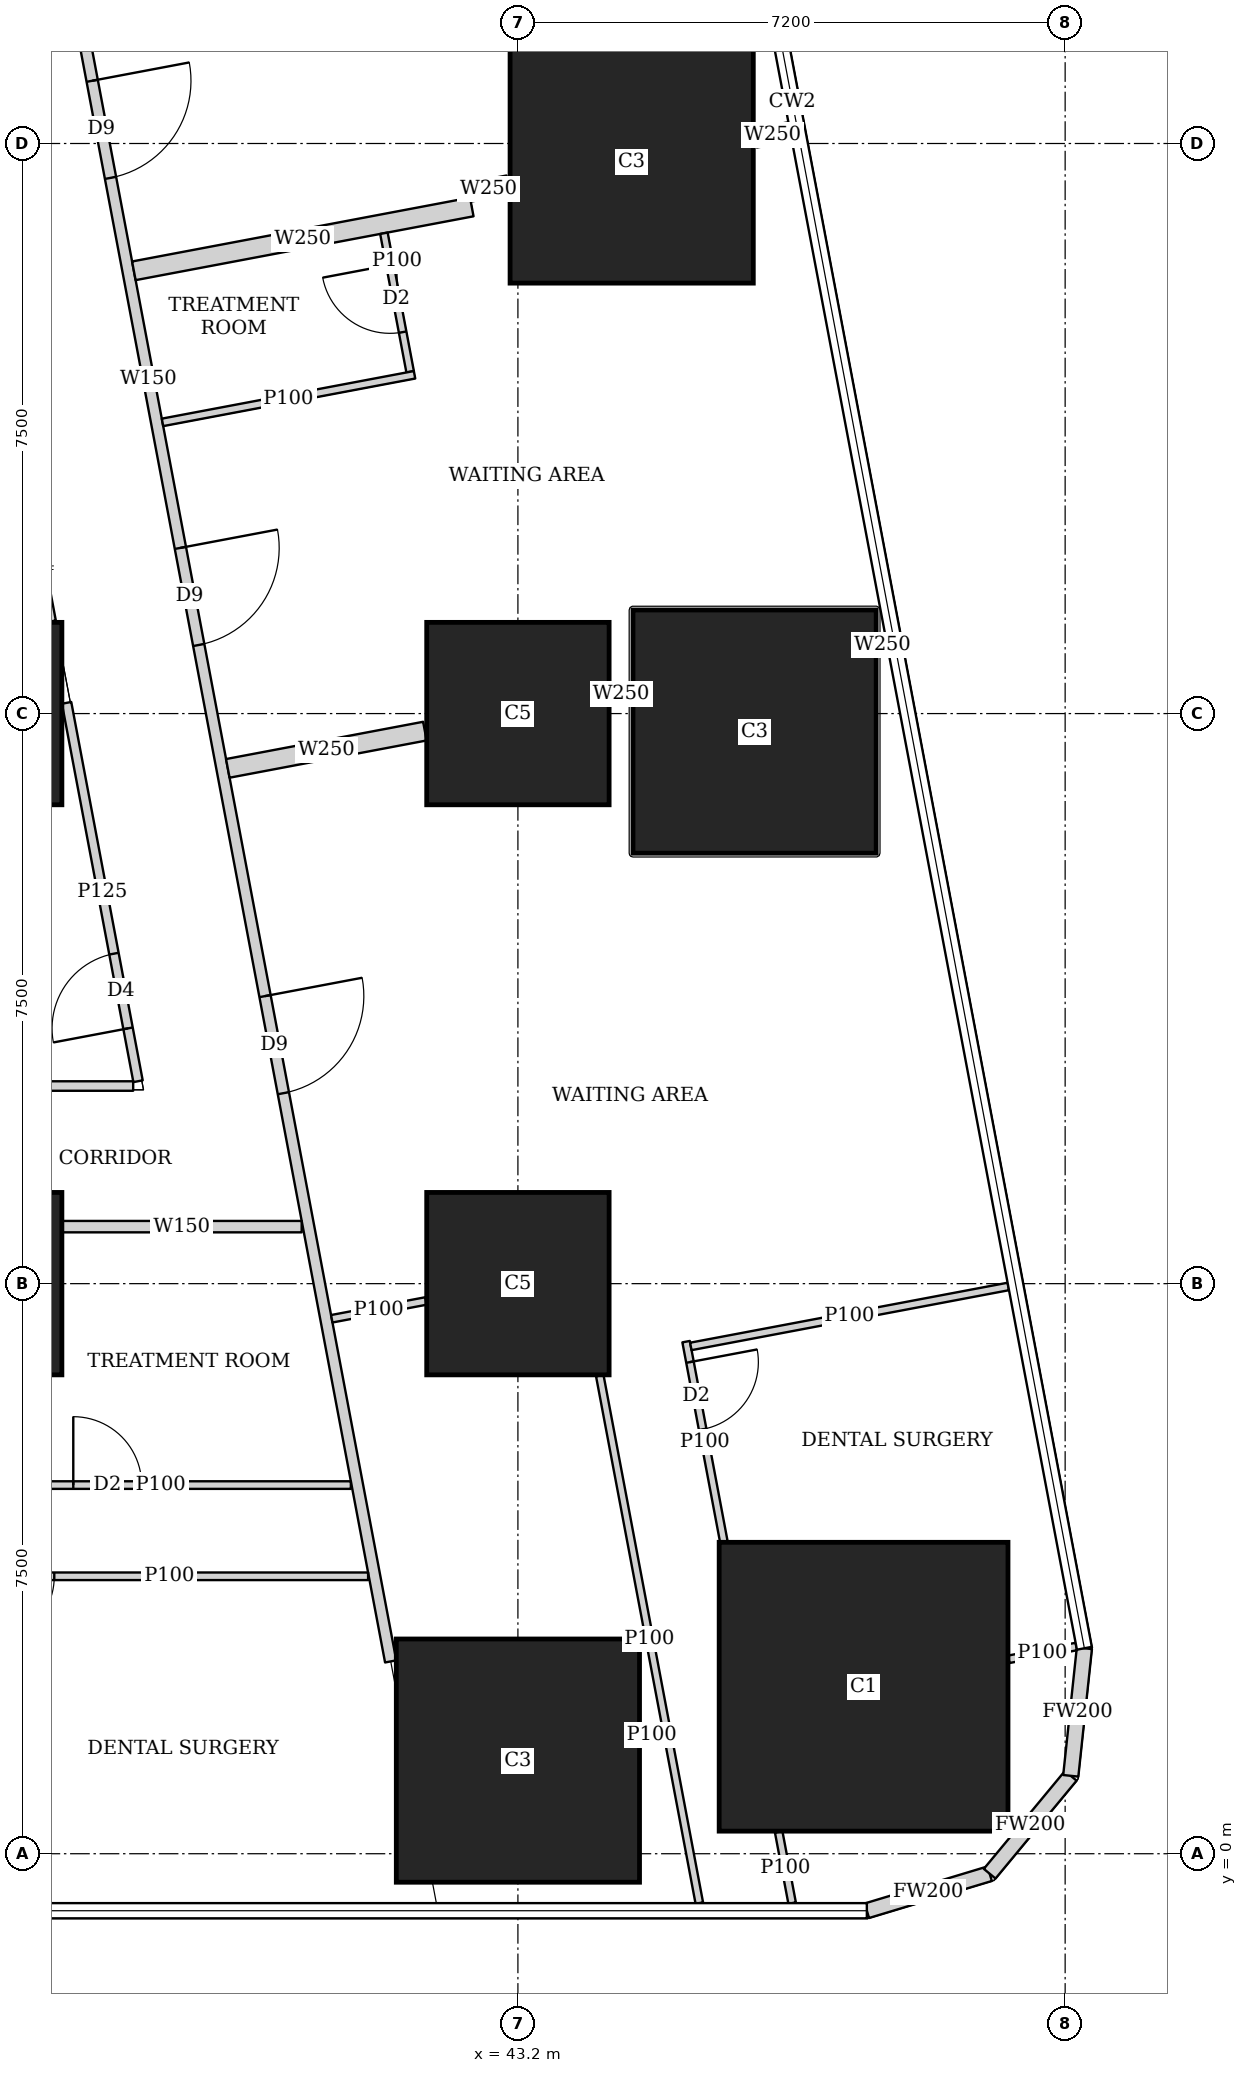
"""IFC4 building model, lengths in metres.
Left out: names, types, materials, properties, quantities, classifications, styles, units other than length and angle.
Written with IfcOpenShell. Run it as: python <this file> out.ifc"""

import sys

from ifc_helpers import new_model, si_unit, direction, frame, frame_2d, origin, origin_2d, place, context, subcontext, project, spatial, rectangle, extrude, element, fill, save


model = new_model("IFC4")
c1 = context("Model", 3, precision=1e-05, world=origin(), true_north=direction((0.0, 1.0)))
c2 = subcontext(c1, "Body", "Model", "MODEL_VIEW")
j1 = project(units=[si_unit("LENGTHUNIT", "METRE"), si_unit("PLANEANGLEUNIT", "RADIAN")], contexts=[c1])
p1 = place(None, origin())
s1 = spatial("IfcSite", under=j1, at=p1, CompositionType="ELEMENT")
p2 = place(p1, origin())
s2 = spatial("IfcBuilding", under=s1, at=p2, CompositionType="ELEMENT")
p3 = place(p2, frame((0.0, 0.0, 10.1)))
s3 = spatial("IfcBuildingStorey", under=s2, at=p3, CompositionType="ELEMENT", Elevation=10.1)
p4 = place(p3, frame((43.2, 1.225, 0.0), z_axis=(0.0, 0.0, 1.0), x_axis=(1.0, 0.0, 0.0)))
e1 = element("IfcColumn", 1, at=p4, inside=s3, PredefinedType="COLUMN", context=c2, shape_type="SweptSolid", body=[
    extrude(rectangle(XDim=3.2, YDim=3.2, at=origin_2d()), origin(), (0.0, 0.0, 1.0), 4.5),
])
p5 = place(p3, frame((47.748, 2.197, 0.0), z_axis=(0.0, 0.0, 1.0), x_axis=(1.0, 0.0, 0.0)))
e2 = element("IfcColumn", 2, at=p5, inside=s3, PredefinedType="COLUMN", context=c2, shape_type="SweptSolid", body=[
    extrude(rectangle(XDim=3.8, YDim=3.8, at=origin_2d()), origin(), (0.0, 0.0, 1.0), 4.5),
])
for number, where, z_axis, x_axis in (
    (3, (36.0, 7.5, 0.0), (0.0, 0.0, 1.0), (1.0, 0.0, 0.0)),
    (4, (43.2, 7.5, 0.0), (0.0, 0.0, 1.0), (1.0, 0.0, 0.0)),
    (5, (36.0, 15.0, 0.0), (0.0, 0.0, 1.0), (1.0, 0.0, 0.0)),
    (6, (43.2, 15.0, 0.0), (0.0, 0.0, 1.0), (1.0, 0.0, 0.0)),
):
    element("IfcColumn", number, at=place(p3, frame(where, z_axis=z_axis, x_axis=x_axis)), inside=s3, PredefinedType="COLUMN", context=c2, shape_type="SweptSolid", body=[
        extrude(rectangle(XDim=2.4, YDim=2.4, at=origin_2d()), origin(), (0.0, 0.0, 1.0), 4.5),
    ])
for number, where, z_axis, x_axis in (
    (7, (46.314, 14.763, 0.0), (0.0, 0.0, 1.0), (1.0, 0.0, 0.0)),
    (8, (44.697, 22.263, 0.0), (0.0, 0.0, 1.0), (1.0, 0.0, 0.0)),
):
    element("IfcColumn", number, at=place(p3, frame(where, z_axis=z_axis, x_axis=x_axis)), inside=s3, PredefinedType="COLUMN", context=c2, shape_type="SweptSolid", body=[
        extrude(rectangle(XDim=3.2, YDim=3.2, at=origin_2d()), origin(), (0.0, 0.0, 1.0), 4.5),
    ])
p6 = place(p3, frame((47.791, -0.75, 0.0), z_axis=(0.0, 0.0, 1.0), x_axis=(0.957455232626, 0.288581838509, 0.0)))
e9 = element("IfcWall", 9, at=p6, inside=s3, PredefinedType="SOLIDWALL", context=c2, shape_type="SweptSolid", body=[
    extrude(rectangle(XDim=1.688, YDim=0.2, at=frame_2d((0.844, 0.0))), origin(), (0.0, 0.0, 1.0), 4.2),
])
p7 = place(p3, frame((49.407, -0.263, 0.0), z_axis=(0.0, 0.0, 1.0), x_axis=(0.638042593423, 0.770001070764, 0.0)))
e10 = element("IfcWall", 10, at=p7, inside=s3, PredefinedType="SOLIDWALL", context=c2, shape_type="SweptSolid", body=[
    extrude(rectangle(XDim=1.673, YDim=0.2, at=frame_2d((0.836, 0.0))), origin(), (0.0, 0.0, 1.0), 4.2),
])
p8 = place(p3, frame((50.474, 1.025, 0.0), z_axis=(0.0, 0.0, 1.0), x_axis=(0.106047815515, 0.994361031429, 0.0)))
e11 = element("IfcWall", 11, at=p8, inside=s3, PredefinedType="SOLIDWALL", context=c2, shape_type="SweptSolid", body=[
    extrude(rectangle(XDim=1.688, YDim=0.2, at=frame_2d((0.844, 0.0))), origin(), (0.0, 0.0, 1.0), 4.2),
])
p9 = place(p3, frame((40.355, 8.25, 0.0), z_axis=(0.0, 0.0, 1.0), x_axis=(-1.0, 0.0, 0.0)))
e12 = element("IfcWall", 12, at=p9, inside=s3, PredefinedType="SOLIDWALL", context=c2, shape_type="SweptSolid", body=[
    extrude(rectangle(XDim=3.154, YDim=0.15, at=frame_2d((1.577, 0.0))), origin(), (0.0, 0.0, 1.0), 2.6),
])
p10 = place(p3, frame((35.151, 36.285, 0.0), z_axis=(0.0, 0.0, 1.0), x_axis=(0.18558085056, -0.982628998099, 0.0)))
e13 = element("IfcWall", 13, at=p10, inside=s3, PredefinedType="SOLIDWALL", context=c2, shape_type="SweptSolid", body=[
    extrude(rectangle(XDim=34.352, YDim=0.15, at=frame_2d((17.176, 0.0))), origin(), (0.0, 0.0, 1.0), 2.4),
])
p11 = place(p10, frame((13.189, 0.0, 0.0)))
e14 = element("IfcOpeningElement", 14, at=p11, cuts=e13, PredefinedType="OPENING", context=c2, shape_type="SweptSolid", body=[
    extrude(rectangle(XDim=1.3, YDim=2.1, at=frame_2d((0.65, 1.05))), frame((0.0, 0.085, 0.0), z_axis=(0.0, -1.0, 0.0), x_axis=(1.0, 0.0, 0.0)), (0.0, 0.0, 1.0), 0.17),
])
p12 = place(p10, frame((19.443, 0.0, 0.0)))
e15 = element("IfcOpeningElement", 15, at=p12, cuts=e13, PredefinedType="OPENING", context=c2, shape_type="SweptSolid", body=[
    extrude(rectangle(XDim=1.3, YDim=2.1, at=frame_2d((0.65, 1.05))), frame((0.0, 0.085, 0.0), z_axis=(0.0, -1.0, 0.0), x_axis=(1.0, 0.0, 0.0)), (0.0, 0.0, 1.0), 0.17),
])
p13 = place(p10, frame((25.444, 0.0, 0.0)))
e16 = element("IfcOpeningElement", 16, at=p13, cuts=e13, PredefinedType="OPENING", context=c2, shape_type="SweptSolid", body=[
    extrude(rectangle(XDim=1.3, YDim=2.1, at=frame_2d((0.65, 1.05))), frame((0.0, 0.085, 0.0), z_axis=(0.0, -1.0, 0.0), x_axis=(1.0, 0.0, 0.0)), (0.0, 0.0, 1.0), 0.17),
])
p14 = place(p3, frame((41.229, 3.65, 0.0), z_axis=(0.0, 0.0, 1.0), x_axis=(-1.0, 0.0, 0.0)))
e17 = element("IfcWall", 17, at=p14, inside=s3, PredefinedType="PARTITIONING", context=c2, shape_type="SweptSolid", body=[
    extrude(rectangle(XDim=5.229, YDim=0.1, at=frame_2d((2.615, 0.0))), origin(), (0.0, 0.0, 1.0), 4.2),
])
p15 = place(p14, frame((4.129, 0.0, 0.0)))
e18 = element("IfcOpeningElement", 18, at=p15, cuts=e17, PredefinedType="OPENING", context=c2, shape_type="SweptSolid", body=[
    extrude(rectangle(XDim=0.9, YDim=2.1, at=frame_2d((0.45, 1.05))), frame((0.0, 0.06, 0.0), z_axis=(0.0, -1.0, 0.0), x_axis=(1.0, 0.0, 0.0)), (0.0, 0.0, 1.0), 0.12),
])
p16 = place(p3, frame((41.002, 4.85, 0.0), z_axis=(0.0, 0.0, 1.0), x_axis=(-1.0, 0.0, 0.0)))
e19 = element("IfcWall", 19, at=p16, inside=s3, PredefinedType="PARTITIONING", context=c2, shape_type="SweptSolid", body=[
    extrude(rectangle(XDim=5.002, YDim=0.1, at=frame_2d((2.501, 0.0))), origin(), (0.0, 0.0, 1.0), 4.2),
])
p17 = place(p16, frame((2.752, 0.0, 0.0)))
e20 = element("IfcOpeningElement", 20, at=p17, cuts=e19, PredefinedType="OPENING", context=c2, shape_type="SweptSolid", body=[
    extrude(rectangle(XDim=0.9, YDim=2.1, at=frame_2d((0.45, 1.05))), frame((0.0, 0.06, 0.0), z_axis=(0.0, -1.0, 0.0), x_axis=(1.0, 0.0, 0.0)), (0.0, 0.0, 1.0), 0.12),
])
p18 = place(p3, frame((41.437, 21.319, 0.0), z_axis=(0.0, 0.0, 1.0), x_axis=(0.186029078128, -0.982544239254, 0.0)))
e21 = element("IfcWall", 21, at=p18, inside=s3, PredefinedType="PARTITIONING", context=c2, shape_type="SweptSolid", body=[
    extrude(rectangle(XDim=1.854, YDim=0.1, at=frame_2d((0.927, 0.0))), origin(), (0.0, 0.0, 1.0), 4.2),
])
p19 = place(p18, frame((0.424, 0.0, 0.0)))
e22 = element("IfcOpeningElement", 22, at=p19, cuts=e21, PredefinedType="OPENING", context=c2, shape_type="SweptSolid", body=[
    extrude(rectangle(XDim=0.9, YDim=2.1, at=frame_2d((0.45, 1.05))), frame((0.0, 0.06, 0.0), z_axis=(0.0, -1.0, 0.0), x_axis=(1.0, 0.0, 0.0)), (0.0, 0.0, 1.0), 0.12),
])
p20 = place(p3, frame((41.84, 19.457, 0.0), z_axis=(0.0, 0.0, 1.0), x_axis=(-0.98264623159, -0.185489577987, 0.0)))
e23 = element("IfcWall", 23, at=p20, inside=s3, PredefinedType="PARTITIONING", context=c2, shape_type="SweptSolid", body=[
    extrude(rectangle(XDim=3.375, YDim=0.1, at=frame_2d((1.688, 0.0))), origin(), (0.0, 0.0, 1.0), 4.2),
])
p21 = place(p3, frame((46.782, 22.657, 0.0), z_axis=(0.0, 0.0, 1.0), x_axis=(-0.982683117999, -0.185294062504, 0.0)))
e24 = element("IfcWall", 24, at=p21, inside=s3, PredefinedType="SOLIDWALL", context=c2, shape_type="SweptSolid", body=[
    extrude(rectangle(XDim=0.469, YDim=0.25, at=frame_2d((0.234, 0.0))), origin(), (0.0, 0.0, 1.0), 2.4),
])
p22 = place(p3, frame((43.073, 21.956, 0.0), z_axis=(0.0, 0.0, 1.0), x_axis=(-0.982395465615, -0.18681313963, 0.0)))
e25 = element("IfcWall", 25, at=p22, inside=s3, PredefinedType="SOLIDWALL", context=c2, shape_type="SweptSolid", body=[
    extrude(rectangle(XDim=0.525, YDim=0.25, at=frame_2d((0.263, 0.0))), origin(), (0.0, 0.0, 1.0), 2.6),
])
p23 = place(p3, frame((42.593, 21.665, 0.0), z_axis=(0.0, 0.0, 1.0), x_axis=(-0.982612837616, -0.185666398014, 0.0)))
e26 = element("IfcWall", 26, at=p23, inside=s3, PredefinedType="SOLIDWALL", context=c2, shape_type="SweptSolid", body=[
    extrude(rectangle(XDim=4.525, YDim=0.25, at=frame_2d((2.262, 0.0))), origin(), (0.0, 0.0, 1.0), 2.6),
])
p24 = place(p3, frame((45.413, 6.737, 0.0), z_axis=(0.0, 0.0, 1.0), x_axis=(0.185263269673, -0.982688923775, 0.0)))
e27 = element("IfcWall", 27, at=p24, inside=s3, PredefinedType="PARTITIONING", context=c2, shape_type="SweptSolid", body=[
    extrude(rectangle(XDim=2.677, YDim=0.1, at=frame_2d((1.338, 0.0))), origin(), (0.0, 0.0, 1.0), 4.2),
])
p25 = place(p24, frame((0.274, 0.0, 0.0)))
e28 = element("IfcOpeningElement", 28, at=p25, cuts=e27, PredefinedType="OPENING", context=c2, shape_type="SweptSolid", body=[
    extrude(rectangle(XDim=0.9, YDim=2.1, at=frame_2d((0.45, 1.05))), frame((0.0, 0.06, 0.0), z_axis=(0.0, -1.0, 0.0), x_axis=(1.0, 0.0, 0.0)), (0.0, 0.0, 1.0), 0.12),
])
p26 = place(p3, frame((46.631, 0.287, 0.0), z_axis=(0.0, 0.0, 1.0), x_axis=(0.185617761613, -0.982622026302, 0.0)))
e29 = element("IfcWall", 29, at=p26, inside=s3, PredefinedType="PARTITIONING", context=c2, shape_type="SweptSolid", body=[
    extrude(rectangle(XDim=0.954, YDim=0.1, at=frame_2d((0.477, 0.0))), origin(), (0.0, 0.0, 1.0), 4.2),
])
p27 = place(p3, frame((44.277, 6.29, 0.0), z_axis=(0.0, 0.0, 1.0), x_axis=(0.18546139356, -0.982651551415, 0.0)))
e30 = element("IfcWall", 30, at=p27, inside=s3, PredefinedType="PARTITIONING", context=c2, shape_type="SweptSolid", body=[
    extrude(rectangle(XDim=7.062, YDim=0.1, at=frame_2d((3.531, 0.0))), origin(), (0.0, 0.0, 1.0), 4.2),
])
p28 = place(p3, frame((49.652, 7.463, 0.0), z_axis=(0.0, 0.0, 1.0), x_axis=(-0.982631433279, -0.185567956101, 0.0)))
e31 = element("IfcWall", 31, at=p28, inside=s3, PredefinedType="PARTITIONING", context=c2, shape_type="SweptSolid", body=[
    extrude(rectangle(XDim=4.251, YDim=0.1, at=frame_2d((2.125, 0.0))), origin(), (0.0, 0.0, 1.0), 2.4),
])
p29 = place(p3, frame((50.547, 2.726, 0.0), z_axis=(0.0, 0.0, 1.0), x_axis=(-0.982620821037, -0.18562414192, 0.0)))
e32 = element("IfcWall", 32, at=p29, inside=s3, PredefinedType="PARTITIONING", context=c2, shape_type="SweptSolid", body=[
    extrude(rectangle(XDim=0.905, YDim=0.1, at=frame_2d((0.452, 0.0))), origin(), (0.0, 0.0, 1.0), 4.2),
])
p30 = place(p3, frame((41.99, 7.272, 0.0), z_axis=(0.0, 0.0, 1.0), x_axis=(-0.982645675559, -0.185492523583, 0.0)))
e33 = element("IfcWall", 33, at=p30, inside=s3, PredefinedType="PARTITIONING", context=c2, shape_type="SweptSolid", body=[
    extrude(rectangle(XDim=1.261, YDim=0.1, at=frame_2d((0.63, 0.0))), origin(), (0.0, 0.0, 1.0), 2.6),
])
p31 = place(p3, frame((45.114, 1.587, 0.0), z_axis=(0.0, 0.0, 1.0), x_axis=(-0.982934694903, -0.183954846516, 0.0)))
e34 = element("IfcWall", 34, at=p31, inside=s3, PredefinedType="PARTITIONING", context=c2, shape_type="SweptSolid", body=[
    extrude(rectangle(XDim=0.309, YDim=0.1, at=frame_2d((0.155, 0.0))), origin(), (0.0, 0.0, 1.0), 4.2),
])
p32 = place(p3, frame((48.055, 15.917, 0.0), z_axis=(0.0, 0.0, 1.0), x_axis=(-0.98280243359, -0.184660164975, 0.0)))
e35 = element("IfcWall", 35, at=p32, inside=s3, PredefinedType="SOLIDWALL", context=c2, shape_type="SweptSolid", body=[
    extrude(rectangle(XDim=0.119, YDim=0.25, at=frame_2d((0.06, 0.0))), origin(), (0.0, 0.0, 1.0), 4.2),
])
p33 = place(p3, frame((44.69, 15.281, 0.0), z_axis=(0.0, 0.0, 1.0), x_axis=(-0.982739122219, -0.184996804458, 0.0)))
e36 = element("IfcWall", 36, at=p33, inside=s3, PredefinedType="SOLIDWALL", context=c2, shape_type="SweptSolid", body=[
    extrude(rectangle(XDim=0.271, YDim=0.25, at=frame_2d((0.135, 0.0))), origin(), (0.0, 0.0, 1.0), 4.2),
])
p34 = place(p3, frame((41.976, 14.769, 0.0), z_axis=(0.0, 0.0, 1.0), x_axis=(-0.982610412957, -0.185679229715, 0.0)))
e37 = element("IfcWall", 37, at=p34, inside=s3, PredefinedType="SOLIDWALL", context=c2, shape_type="SweptSolid", body=[
    extrude(rectangle(XDim=2.639, YDim=0.25, at=frame_2d((1.319, 0.0))), origin(), (0.0, 0.0, 1.0), 2.6),
])
p35 = place(p3, frame((28.95, 10.1, 0.0), z_axis=(0.0, 0.0, 1.0), x_axis=(1.0, 0.0, 0.0)))
e38 = element("IfcWall", 38, at=p35, inside=s3, PredefinedType="PARTITIONING", context=c2, shape_type="SweptSolid", body=[
    extrude(rectangle(XDim=9.188, YDim=0.125, at=frame_2d((4.594, 0.0))), origin(), (0.0, 0.0, 1.0), 2.2),
])
p36 = place(p3, frame((38.202, 10.163, 0.0), z_axis=(0.0, 0.0, 1.0), x_axis=(-0.185539561605, 0.982636795097, 0.0)))
e39 = element("IfcWall", 39, at=p36, inside=s3, PredefinedType="PARTITIONING", context=c2, shape_type="SweptSolid", body=[
    extrude(rectangle(XDim=5.066, YDim=0.125, at=frame_2d((2.533, 0.0))), origin(), (0.0, 0.0, 1.0), 2.6),
])
p37 = place(p36, frame((0.708, 0.0, 0.0)))
e40 = element("IfcOpeningElement", 40, at=p37, cuts=e39, PredefinedType="OPENING", context=c2, shape_type="SweptSolid", body=[
    extrude(rectangle(XDim=1.0, YDim=2.1, at=frame_2d((0.5, 1.05))), frame((0.0, 0.073, 0.0), z_axis=(0.0, -1.0, 0.0), x_axis=(1.0, 0.0, 0.0)), (0.0, 0.0, 1.0), 0.145),
])
p38 = place(p3, frame((37.059, 16.213, 0.0), z_axis=(0.0, 0.0, 1.0), x_axis=(-0.185585225745, 0.982628171785, 0.0)))
e41 = element("IfcWall", 41, at=p38, inside=s3, PredefinedType="PARTITIONING", context=c2, shape_type="SweptSolid", body=[
    extrude(rectangle(XDim=15.072, YDim=0.125, at=frame_2d((7.536, 0.0))), origin(), (0.0, 0.0, 1.0), 2.6),
])
p39 = place(p38, frame((7.221, 0.0, 0.0)))
e42 = element("IfcOpeningElement", 42, at=p39, cuts=e41, PredefinedType="OPENING", context=c2, shape_type="SweptSolid", body=[
    extrude(rectangle(XDim=1.0, YDim=2.1, at=frame_2d((0.5, 1.05))), frame((0.0, 0.073, 0.0), z_axis=(0.0, -1.0, 0.0), x_axis=(1.0, 0.0, 0.0)), (0.0, 0.0, 1.0), 0.145),
])
p40 = place(p38, frame((0.25, 0.0, 0.0)))
e43 = element("IfcOpeningElement", 43, at=p40, cuts=e41, PredefinedType="OPENING", context=c2, shape_type="SweptSolid", body=[
    extrude(rectangle(XDim=1.0, YDim=2.1, at=frame_2d((0.5, 1.05))), frame((0.0, 0.073, 0.0), z_axis=(0.0, -1.0, 0.0), x_axis=(1.0, 0.0, 0.0)), (0.0, 0.0, 1.0), 0.145),
])
p41 = place(p38, frame((3.99, 0.0, 0.0)))
e44 = element("IfcOpeningElement", 44, at=p41, cuts=e41, PredefinedType="OPENING", context=c2, shape_type="SweptSolid", body=[
    extrude(rectangle(XDim=1.0, YDim=2.1, at=frame_2d((0.5, 1.05))), frame((0.0, 0.073, 0.0), z_axis=(0.0, -1.0, 0.0), x_axis=(1.0, 0.0, 0.0)), (0.0, 0.0, 1.0), 0.145),
])
p42 = place(p15, origin())
e45 = element("IfcDoor", 45, at=p42, inside=s3, OperationType="SINGLE_SWING_RIGHT", PredefinedType="DOOR", context=c2, shape_type="SweptSolid", body=[
    extrude(rectangle(XDim=0.9, YDim=2.1, at=frame_2d((0.45, 1.05))), frame((0.0, 0.025, 0.0), z_axis=(0.0, -1.0, 0.0), x_axis=(1.0, 0.0, 0.0)), (0.0, 0.0, 1.0), 0.05),
])
fill(e18, e45)
p43 = place(p17, origin())
e46 = element("IfcDoor", 46, at=p43, inside=s3, OperationType="SINGLE_SWING_LEFT", PredefinedType="DOOR", context=c2, shape_type="SweptSolid", body=[
    extrude(rectangle(XDim=0.9, YDim=2.1, at=frame_2d((0.45, 1.05))), frame((0.0, 0.025, 0.0), z_axis=(0.0, -1.0, 0.0), x_axis=(1.0, 0.0, 0.0)), (0.0, 0.0, 1.0), 0.05),
])
fill(e20, e46)
p44 = place(p11, origin())
e47 = element("IfcDoor", 47, at=p44, inside=s3, OperationType="DOUBLE_DOOR_SINGLE_SWING", PredefinedType="DOOR", context=c2, shape_type="SweptSolid", body=[
    extrude(rectangle(XDim=1.3, YDim=2.1, at=frame_2d((0.65, 1.05))), frame((0.0, 0.025, 0.0), z_axis=(0.0, -1.0, 0.0), x_axis=(1.0, 0.0, 0.0)), (0.0, 0.0, 1.0), 0.05),
])
fill(e14, e47)
p45 = place(p19, origin())
e48 = element("IfcDoor", 48, at=p45, inside=s3, OperationType="SINGLE_SWING_RIGHT", PredefinedType="DOOR", context=c2, shape_type="SweptSolid", body=[
    extrude(rectangle(XDim=0.9, YDim=2.1, at=frame_2d((0.45, 1.05))), frame((0.0, 0.025, 0.0), z_axis=(0.0, -1.0, 0.0), x_axis=(1.0, 0.0, 0.0)), (0.0, 0.0, 1.0), 0.05),
])
fill(e22, e48)
p46 = place(p12, origin())
e49 = element("IfcDoor", 49, at=p46, inside=s3, OperationType="DOUBLE_DOOR_SINGLE_SWING", PredefinedType="DOOR", context=c2, shape_type="SweptSolid", body=[
    extrude(rectangle(XDim=1.3, YDim=2.1, at=frame_2d((0.65, 1.05))), frame((0.0, 0.025, 0.0), z_axis=(0.0, -1.0, 0.0), x_axis=(1.0, 0.0, 0.0)), (0.0, 0.0, 1.0), 0.05),
])
fill(e15, e49)
p47 = place(p25, origin())
e50 = element("IfcDoor", 50, at=p47, inside=s3, OperationType="SINGLE_SWING_LEFT", PredefinedType="DOOR", context=c2, shape_type="SweptSolid", body=[
    extrude(rectangle(XDim=0.9, YDim=2.1, at=frame_2d((0.45, 1.05))), frame((0.0, 0.025, 0.0), z_axis=(0.0, -1.0, 0.0), x_axis=(1.0, 0.0, 0.0)), (0.0, 0.0, 1.0), 0.05),
])
fill(e28, e50)
p48 = place(p13, origin())
e51 = element("IfcDoor", 51, at=p48, inside=s3, OperationType="DOUBLE_DOOR_SINGLE_SWING", PredefinedType="DOOR", context=c2, shape_type="SweptSolid", body=[
    extrude(rectangle(XDim=1.3, YDim=2.1, at=frame_2d((0.65, 1.05))), frame((0.0, 0.025, 0.0), z_axis=(0.0, -1.0, 0.0), x_axis=(1.0, 0.0, 0.0)), (0.0, 0.0, 1.0), 0.05),
])
fill(e16, e51)
p49 = place(p37, origin())
e52 = element("IfcDoor", 52, at=p49, inside=s3, OperationType="SINGLE_SWING_LEFT", PredefinedType="DOOR", context=c2, shape_type="SweptSolid", body=[
    extrude(rectangle(XDim=1.0, YDim=2.1, at=frame_2d((0.5, 1.05))), frame((0.0, 0.025, 0.0), z_axis=(0.0, -1.0, 0.0), x_axis=(1.0, 0.0, 0.0)), (0.0, 0.0, 1.0), 0.05),
])
fill(e40, e52)
save(model, sys.argv[1])
